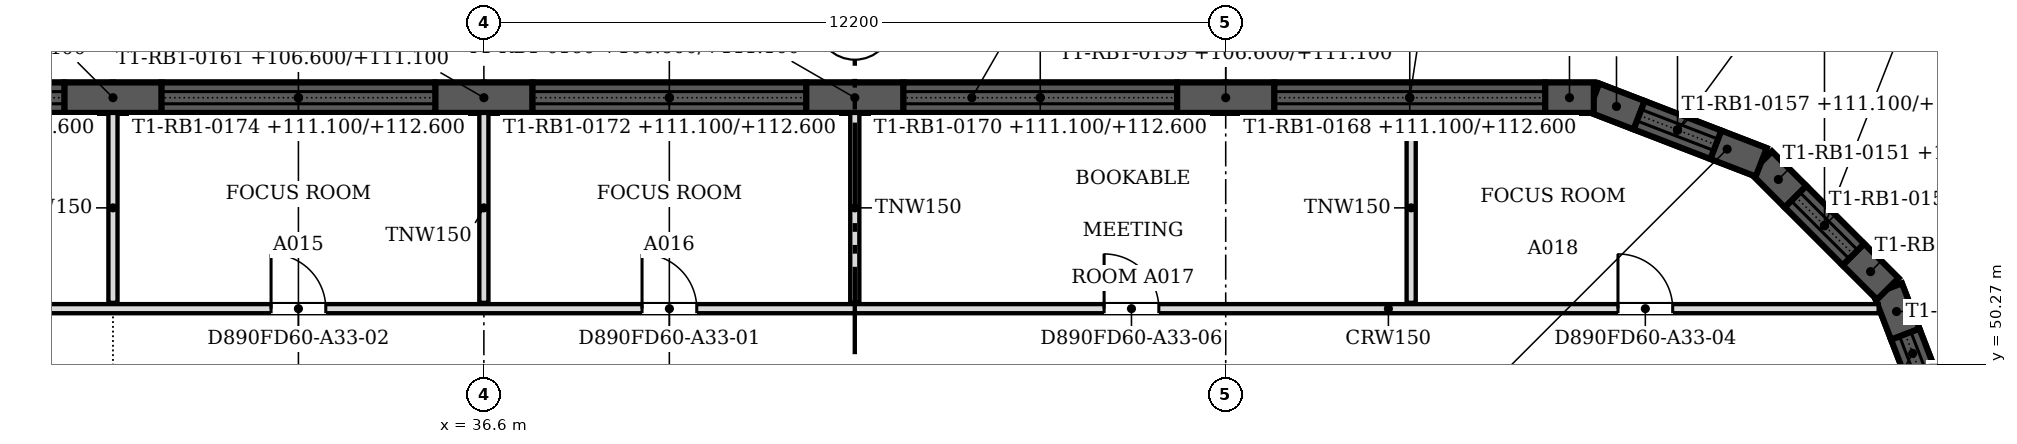
"""IFC4 building model, lengths in metres.
Left out: names, types, materials, properties, quantities, classifications, styles, units other than length and angle.
Written with IfcOpenShell. Run it as: python <this file> out.ifc"""

import sys

from ifc_helpers import new_model, si_unit, direction, frame, frame_2d, origin, place, context, subcontext, project, spatial, polyline, rectangle, outline, extrude, faceted_brep, source, transform, mapped, element, fill, save


model = new_model("IFC4")
c1 = context("Model", 3, precision=1e-05, world=origin(), true_north=direction((0.0, 1.0)))
c2 = subcontext(c1, "Body", "Model", "MODEL_VIEW")
j1 = project(units=[si_unit("LENGTHUNIT", "METRE"), si_unit("PLANEANGLEUNIT", "RADIAN")], contexts=[c1])
p1 = place(None, origin())
s1 = spatial("IfcSite", under=j1, at=p1, CompositionType="ELEMENT")
p2 = place(p1, origin())
s2 = spatial("IfcBuilding", under=s1, at=p2, CompositionType="ELEMENT")
p3 = place(p2, frame((0.0, 0.0, 106.6)))
s3 = spatial("IfcBuildingStorey", under=s2, at=p3, CompositionType="ELEMENT", Elevation=106.6)
m1 = source(origin(), c2, "Body", "Brep", [
    faceted_brep([(0.0, -0.25, 0.0), (0.8, -0.25, 0.0), (0.8, -0.25, 4.5), (0.0, -0.25, 4.5), (0.0, 0.25, 4.5), (0.747, 0.25, 4.5), (0.747, 0.25, 0.0), (0.0, 0.25, 0.0), (0.8, -0.0, 0.0), (0.8, -0.0, 4.5)], [[[0, 1, 2, 3]], [[4, 5, 6, 7]], [[7, 6, 8, 1, 0]], [[9, 2, 1, 8]], [[5, 4, 3, 2, 9]], [[4, 7, 0, 3]], [[8, 6, 5, 9]]]),
])
p4 = place(p3, frame((59.976, 50.76, 0.0), z_axis=(0.0, 0.0, 1.0), x_axis=(-0.360001058183, 0.932951894851, 0.0)))
e1 = element("IfcWall", 1, at=p4, inside=s3, PredefinedType="SOLIDWALL", context=c2, shape_type="MappedRepresentation", body=[
    mapped(m1, transform((0.0, 0.0, 0.0), scale=1.0)),
])
m2 = source(origin(), c2, "Body", "SweptSolid", [
    extrude(outline(polyline([(0.0, 0.0), (1.351, 0.0), (1.351, 1.0), (0.0, 1.0), (0.0, 0.0)])), frame((0.0, 0.25, 0.0), z_axis=(0.0, -1.0, 0.0), x_axis=(1.0, 0.0, 0.0)), (0.0, 0.0, 1.0), 0.5),
])
p5 = place(p3, frame((60.462, 49.5, 0.0), z_axis=(0.0, 0.0, 1.0), x_axis=(-0.359923772835, 0.932981713512, 0.0)))
e2 = element("IfcWall", 2, at=p5, inside=s3, PredefinedType="SOLIDWALL", context=c2, shape_type="MappedRepresentation", body=[
    mapped(m2, transform((0.0, 0.0, 0.0), scale=1.0)),
])
m3 = source(origin(), c2, "Body", "Brep", [
    faceted_brep([(0.0, -0.25, 0.0), (2.95, -0.25, 0.0), (2.95, -0.25, 1.5), (0.0, -0.25, 1.5), (0.047, 0.25, 1.5), (2.898, 0.25, 1.5), (2.898, 0.25, 0.0), (0.047, 0.25, 0.0), (2.95, 0.0, 0.0), (0.0, 0.0, 0.0), (2.95, 0.0, 1.5), (0.0, 0.0, 1.5)], [[[0, 1, 2, 3]], [[4, 5, 6, 7]], [[7, 6, 8, 1, 0, 9]], [[10, 2, 1, 8]], [[5, 4, 11, 3, 2, 10]], [[9, 0, 3, 11]], [[7, 9, 11, 4]], [[8, 6, 5, 10]]]),
])
p6 = place(p3, frame((60.75, 48.753, 4.5), z_axis=(0.0, 0.0, 1.0), x_axis=(-0.359877213415, 0.932999673775, 0.0)))
e3 = element("IfcWall", 3, at=p6, inside=s3, PredefinedType="SOLIDWALL", context=c2, shape_type="MappedRepresentation", body=[
    mapped(m3, transform((0.0, 0.0, 0.0), scale=1.0)),
])
m4 = source(origin(), c2, "Body", "Brep", [
    faceted_brep([(0.0, -0.25, 0.0), (0.8, -0.25, 0.0), (0.8, -0.25, 4.5), (0.0, -0.25, 4.5), (0.053, 0.25, 4.5), (0.8, 0.25, 4.5), (0.8, 0.25, 0.0), (0.053, 0.25, 0.0), (0.0, 0.0, 0.0), (0.0, 0.0, 4.5)], [[[0, 1, 2, 3]], [[4, 5, 6, 7]], [[7, 6, 1, 0, 8]], [[5, 4, 9, 3, 2]], [[8, 0, 3, 9]], [[7, 8, 9, 4]], [[1, 6, 5, 2]]]),
])
p7 = place(p3, frame((59.688, 51.506, 0.0), z_axis=(0.0, 0.0, 1.0), x_axis=(-0.707106781187, 0.707106781187, 0.0)))
e4 = element("IfcWall", 4, at=p7, inside=s3, PredefinedType="SOLIDWALL", context=c2, shape_type="MappedRepresentation", body=[
    mapped(m4, transform((0.0, 0.0, 0.0), scale=1.0)),
])
m5 = source(origin(), c2, "Body", "Brep", [
    faceted_brep([(0.0, -0.25, 0.0), (0.8, -0.25, 0.0), (0.8, -0.25, 4.5), (0.0, -0.25, 4.5), (0.0, 0.25, 4.5), (0.747, 0.25, 4.5), (0.747, 0.25, 0.0), (0.0, 0.25, 0.0), (0.8, -0.0, 0.0), (0.8, -0.0, 4.5)], [[[0, 1, 2, 3]], [[4, 5, 6, 7]], [[7, 6, 8, 1, 0]], [[9, 2, 1, 8]], [[5, 4, 3, 2, 9]], [[4, 7, 0, 3]], [[8, 6, 5, 9]]]),
])
p8 = place(p3, frame((58.172, 53.022, 0.0), z_axis=(0.0, 0.0, 1.0), x_axis=(-0.707106781187, 0.707106781187, 0.0)))
e5 = element("IfcWall", 5, at=p8, inside=s3, PredefinedType="SOLIDWALL", context=c2, shape_type="MappedRepresentation", body=[
    mapped(m5, transform((0.0, 0.0, 0.0), scale=1.0)),
])
m6 = source(origin(), c2, "Body", "SweptSolid", [
    extrude(outline(polyline([(0.0, 0.0), (1.344, 0.0), (1.344, 1.0), (0.0, 1.0), (0.0, 0.0)])), frame((0.0, 0.25, 0.0), z_axis=(0.0, -1.0, 0.0), x_axis=(1.0, 0.0, 0.0)), (0.0, 0.0, 1.0), 0.5),
])
p9 = place(p3, frame((59.122, 52.072, 0.0), z_axis=(0.0, 0.0, 1.0), x_axis=(-0.707106781187, 0.707106781187, 0.0)))
e6 = element("IfcWall", 6, at=p9, inside=s3, PredefinedType="SOLIDWALL", context=c2, shape_type="MappedRepresentation", body=[
    mapped(m6, transform((0.0, 0.0, 0.0), scale=1.0)),
])
m7 = source(origin(), c2, "Body", "Brep", [
    faceted_brep([(0.0, -0.25, 0.0), (2.944, -0.25, 0.0), (2.944, -0.25, 1.5), (0.0, -0.25, 1.5), (0.053, 0.25, 1.5), (2.891, 0.25, 1.5), (2.891, 0.25, 0.0), (0.053, 0.25, 0.0), (2.944, 0.0, 0.0), (0.0, 0.0, 0.0), (2.944, 0.0, 1.5), (0.0, 0.0, 1.5)], [[[0, 1, 2, 3]], [[4, 5, 6, 7]], [[7, 6, 8, 1, 0, 9]], [[10, 2, 1, 8]], [[5, 4, 11, 3, 2, 10]], [[9, 0, 3, 11]], [[7, 9, 11, 4]], [[8, 6, 5, 10]]]),
])
p10 = place(p3, frame((59.688, 51.506, 4.5), z_axis=(0.0, 0.0, 1.0), x_axis=(-0.707106781187, 0.707106781187, 0.0)))
e7 = element("IfcWall", 7, at=p10, inside=s3, PredefinedType="SOLIDWALL", context=c2, shape_type="MappedRepresentation", body=[
    mapped(m7, transform((0.0, 0.0, 0.0), scale=1.0)),
])
m8 = source(origin(), c2, "Body", "Brep", [
    faceted_brep([(0.0, -0.25, 0.0), (0.8, -0.25, 0.0), (0.8, -0.25, 4.5), (0.0, -0.25, 4.5), (0.053, 0.25, 4.5), (0.8, 0.25, 4.5), (0.8, 0.25, 0.0), (0.053, 0.25, 0.0), (0.0, 0.0, 0.0), (0.0, 0.0, 4.5)], [[[0, 1, 2, 3]], [[4, 5, 6, 7]], [[7, 6, 1, 0, 8]], [[5, 4, 9, 3, 2]], [[8, 0, 3, 9]], [[7, 8, 9, 4]], [[1, 6, 5, 2]]]),
])
p11 = place(p3, frame((57.606, 53.588, 0.0), z_axis=(0.0, 0.0, 1.0), x_axis=(-0.93301483327, 0.3598379092, 0.0)))
e8 = element("IfcWall", 8, at=p11, inside=s3, PredefinedType="SOLIDWALL", context=c2, shape_type="MappedRepresentation", body=[
    mapped(m8, transform((0.0, 0.0, 0.0), scale=1.0)),
])
m9 = source(origin(), c2, "Body", "Brep", [
    faceted_brep([(0.0, -0.25, 0.0), (0.8, -0.25, 0.0), (0.8, -0.25, 4.5), (0.0, -0.25, 4.5), (0.0, 0.25, 4.5), (0.753, 0.25, 4.5), (0.753, 0.25, 0.0), (0.0, 0.25, 0.0), (0.8, -0.0, 0.0), (0.8, -0.0, 4.5)], [[[0, 1, 2, 3]], [[4, 5, 6, 7]], [[7, 6, 8, 1, 0]], [[9, 2, 1, 8]], [[5, 4, 3, 2, 9]], [[4, 7, 0, 3]], [[8, 6, 5, 9]]]),
])
p12 = place(p3, frame((55.6, 54.362, 0.0), z_axis=(0.0, 0.0, 1.0), x_axis=(-0.93301483327, 0.3598379092, 0.0)))
e9 = element("IfcWall", 9, at=p12, inside=s3, PredefinedType="SOLIDWALL", context=c2, shape_type="MappedRepresentation", body=[
    mapped(m9, transform((0.0, 0.0, 0.0), scale=1.0)),
])
p13 = place(p3, frame((56.86, 53.876, 0.0), z_axis=(0.0, 0.0, 1.0), x_axis=(-0.932981713512, 0.359923772835, 0.0)))
e10 = element("IfcWall", 10, at=p13, inside=s3, PredefinedType="SOLIDWALL", context=c2, shape_type="MappedRepresentation", body=[
    mapped(m2, transform((0.0, 0.0, 0.0), scale=1.0)),
])
m10 = source(origin(), c2, "Body", "Brep", [
    faceted_brep([(0.0, -0.25, 0.0), (2.95, -0.25, 0.0), (2.95, -0.25, 1.5), (0.0, -0.25, 1.5), (0.053, 0.25, 1.5), (2.904, 0.25, 1.5), (2.904, 0.25, 0.0), (0.053, 0.25, 0.0), (2.95, 0.0, 0.0), (0.0, 0.0, 0.0), (2.95, 0.0, 1.5), (0.0, 0.0, 1.5)], [[[0, 1, 2, 3]], [[4, 5, 6, 7]], [[7, 6, 8, 1, 0, 9]], [[10, 2, 1, 8]], [[5, 4, 11, 3, 2, 10]], [[9, 0, 3, 11]], [[7, 9, 11, 4]], [[8, 6, 5, 10]]]),
])
p14 = place(p3, frame((57.606, 53.588, 4.5), z_axis=(0.0, 0.0, 1.0), x_axis=(-0.932999673775, 0.359877213415, 0.0)))
e11 = element("IfcWall", 11, at=p14, inside=s3, PredefinedType="SOLIDWALL", context=c2, shape_type="MappedRepresentation", body=[
    mapped(m10, transform((0.0, 0.0, 0.0), scale=1.0)),
])
m11 = source(origin(), c2, "Body", "Brep", [
    faceted_brep([(0.0, -0.25, 0.0), (0.8, -0.25, 0.0), (0.8, -0.25, 4.5), (0.0, -0.25, 4.5), (0.047, 0.25, 4.5), (0.8, 0.25, 4.5), (0.8, 0.25, 0.0), (0.047, 0.25, 0.0), (0.0, 0.0, 0.0), (0.0, 0.0, 4.5)], [[[0, 1, 2, 3]], [[4, 5, 6, 7]], [[7, 6, 1, 0, 8]], [[5, 4, 9, 3, 2]], [[8, 0, 3, 9]], [[7, 8, 9, 4]], [[1, 6, 5, 2]]]),
])
p15 = place(p3, frame((54.854, 54.65, 0.0), z_axis=(0.0, 0.0, 1.0), x_axis=(-1.0, 0.0, 0.0)))
e12 = element("IfcWall", 12, at=p15, inside=s3, PredefinedType="SOLIDWALL", context=c2, shape_type="MappedRepresentation", body=[
    mapped(m11, transform((0.0, 0.0, 0.0), scale=1.0)),
])
m12 = source(origin(), c2, "Body", "SweptSolid", [
    extrude(outline(polyline([(0.0, 0.0), (1.6, 0.0), (1.6, 4.5), (0.0, 4.5), (0.0, 0.0)])), frame((0.0, 0.25, 0.0), z_axis=(0.0, -1.0, 0.0), x_axis=(1.0, 0.0, 0.0)), (0.0, 0.0, 1.0), 0.5),
])
for number, where, z_axis, x_axis in (
    (13, (49.6, 54.65, 0.0), (0.0, 0.0, 1.0), (-1.0, 0.0, 0.0)),
    (14, (43.5, 54.65, 0.0), (0.0, 0.0, 1.0), (-1.0, 0.0, 0.0)),
):
    element("IfcWall", number, at=place(p3, frame(where, z_axis=z_axis, x_axis=x_axis)), inside=s3, PredefinedType="SOLIDWALL", context=c2, shape_type="MappedRepresentation", body=[
        mapped(m12, transform((0.0, 0.0, 0.0), scale=1.0)),
    ])
m13 = source(origin(), c2, "Body", "Brep", [
    faceted_brep([(0.0, -0.25, 0.0), (1.6, -0.25, 0.0), (1.6, -0.25, 4.5), (0.0, -0.25, 4.5), (0.0, 0.25, 4.5), (1.6, 0.25, 4.5), (1.6, 0.25, 0.0), (0.0, 0.25, 0.0)], [[[0, 1, 2, 3]], [[4, 5, 6, 7]], [[7, 6, 1, 0]], [[5, 4, 3, 2]], [[4, 7, 0, 3]], [[1, 6, 5, 2]]]),
])
p16 = place(p3, frame((37.4, 54.65, 0.0), z_axis=(0.0, 0.0, 1.0), x_axis=(-1.0, 0.0, 0.0)))
e15 = element("IfcWall", 15, at=p16, inside=s3, PredefinedType="SOLIDWALL", context=c2, shape_type="MappedRepresentation", body=[
    mapped(m13, transform((0.0, 0.0, 0.0), scale=1.0)),
])
p17 = place(p3, frame((31.3, 54.65, 0.0), z_axis=(0.0, 0.0, 1.0), x_axis=(-1.0, 0.0, 0.0)))
e16 = element("IfcWall", 16, at=p17, inside=s3, PredefinedType="SOLIDWALL", context=c2, shape_type="MappedRepresentation", body=[
    mapped(m12, transform((0.0, 0.0, 0.0), scale=1.0)),
])
m14 = source(origin(), c2, "Body", "SweptSolid", [
    extrude(outline(polyline([(0.0, 0.0), (4.453, 0.0), (4.453, 1.0), (0.0, 1.0), (0.0, 0.0)])), frame((0.0, 0.25, 0.0), z_axis=(0.0, -1.0, 0.0), x_axis=(1.0, 0.0, 0.0)), (0.0, 0.0, 1.0), 0.5),
])
p18 = place(p3, frame((54.053, 54.65, 0.0), z_axis=(0.0, 0.0, 1.0), x_axis=(-1.0, 0.0, 0.0)))
e17 = element("IfcWall", 17, at=p18, inside=s3, PredefinedType="SOLIDWALL", context=c2, shape_type="MappedRepresentation", body=[
    mapped(m14, transform((0.0, 0.0, 0.0), scale=1.0)),
])
m15 = source(origin(), c2, "Body", "Brep", [
    faceted_brep([(0.0, -0.25, 0.0), (6.053, -0.25, 0.0), (6.053, -0.25, 1.5), (0.0, -0.25, 1.5), (0.047, 0.25, 1.5), (6.053, 0.25, 1.5), (6.053, 0.25, 0.0), (0.047, 0.25, 0.0), (0.0, 0.0, 0.0), (0.0, 0.0, 1.5)], [[[0, 1, 2, 3]], [[4, 5, 6, 7]], [[7, 6, 1, 0, 8]], [[5, 4, 9, 3, 2]], [[8, 0, 3, 9]], [[7, 8, 9, 4]], [[1, 6, 5, 2]]]),
])
p19 = place(p3, frame((54.854, 54.65, 4.5), z_axis=(0.0, 0.0, 1.0), x_axis=(-1.0, 0.0, 0.0)))
e18 = element("IfcWall", 18, at=p19, inside=s3, PredefinedType="SOLIDWALL", context=c2, shape_type="MappedRepresentation", body=[
    mapped(m15, transform((0.0, 0.0, 0.0), scale=1.0)),
])
m16 = source(origin(), c2, "Body", "SweptSolid", [
    extrude(outline(polyline([(0.0, 0.0), (4.5, 0.0), (4.5, 1.0), (0.0, 1.0), (0.0, 0.0)])), frame((0.0, 0.25, 0.0), z_axis=(0.0, -1.0, 0.0), x_axis=(1.0, 0.0, 0.0)), (0.0, 0.0, 1.0), 0.5),
])
p20 = place(p3, frame((48.0, 54.65, 0.0), z_axis=(0.0, 0.0, 1.0), x_axis=(-1.0, 0.0, 0.0)))
e19 = element("IfcWall", 19, at=p20, inside=s3, PredefinedType="SOLIDWALL", context=c2, shape_type="MappedRepresentation", body=[
    mapped(m16, transform((0.0, 0.0, 0.0), scale=1.0)),
])
m17 = source(origin(), c2, "Body", "SweptSolid", [
    extrude(outline(polyline([(0.0, 0.0), (6.1, 0.0), (6.1, 1.5), (0.0, 1.5), (0.0, 0.0)])), frame((0.0, 0.25, 0.0), z_axis=(0.0, -1.0, 0.0), x_axis=(1.0, 0.0, 0.0)), (0.0, 0.0, 1.0), 0.5),
])
p21 = place(p3, frame((48.8, 54.65, 4.5), z_axis=(0.0, 0.0, 1.0), x_axis=(-1.0, 0.0, 0.0)))
e20 = element("IfcWall", 20, at=p21, inside=s3, PredefinedType="SOLIDWALL", context=c2, shape_type="MappedRepresentation", body=[
    mapped(m17, transform((0.0, 0.0, 0.0), scale=1.0)),
])
p22 = place(p3, frame((41.9, 54.65, 0.0), z_axis=(0.0, 0.0, 1.0), x_axis=(-1.0, 0.0, 0.0)))
e21 = element("IfcWall", 21, at=p22, inside=s3, PredefinedType="SOLIDWALL", context=c2, shape_type="MappedRepresentation", body=[
    mapped(m16, transform((0.0, 0.0, 0.0), scale=1.0)),
])
m18 = source(origin(), c2, "Body", "Brep", [
    faceted_brep([(0.0, -0.25, 0.0), (6.1, -0.25, 0.0), (6.1, -0.25, 1.5), (0.0, -0.25, 1.5), (0.0, 0.25, 1.5), (6.1, 0.25, 1.5), (6.1, 0.25, 0.0), (0.0, 0.25, 0.0)], [[[0, 1, 2, 3]], [[4, 5, 6, 7]], [[7, 6, 1, 0]], [[5, 4, 3, 2]], [[4, 7, 0, 3]], [[1, 6, 5, 2]]]),
])
p23 = place(p3, frame((42.7, 54.65, 4.5), z_axis=(0.0, 0.0, 1.0), x_axis=(-1.0, 0.0, 0.0)))
e22 = element("IfcWall", 22, at=p23, inside=s3, PredefinedType="SOLIDWALL", context=c2, shape_type="MappedRepresentation", body=[
    mapped(m18, transform((0.0, 0.0, 0.0), scale=1.0)),
])
p24 = place(p3, frame((35.8, 54.65, 0.0), z_axis=(0.0, 0.0, 1.0), x_axis=(-1.0, 0.0, 0.0)))
e23 = element("IfcWall", 23, at=p24, inside=s3, PredefinedType="SOLIDWALL", context=c2, shape_type="MappedRepresentation", body=[
    mapped(m16, transform((0.0, 0.0, 0.0), scale=1.0)),
])
p25 = place(p3, frame((36.6, 54.65, 4.5), z_axis=(0.0, 0.0, 1.0), x_axis=(-1.0, 0.0, 0.0)))
e24 = element("IfcWall", 24, at=p25, inside=s3, PredefinedType="SOLIDWALL", context=c2, shape_type="MappedRepresentation", body=[
    mapped(m17, transform((0.0, 0.0, 0.0), scale=1.0)),
])
p26 = place(p3, frame((29.7, 54.65, 0.0), z_axis=(0.0, 0.0, 1.0), x_axis=(-1.0, 0.0, 0.0)))
e25 = element("IfcWall", 25, at=p26, inside=s3, PredefinedType="SOLIDWALL", context=c2, shape_type="MappedRepresentation", body=[
    mapped(m16, transform((0.0, 0.0, 0.0), scale=1.0)),
])
p27 = place(p3, frame((30.5, 54.65, 4.5), z_axis=(0.0, 0.0, 1.0), x_axis=(-1.0, 0.0, 0.0)))
e26 = element("IfcWall", 26, at=p27, inside=s3, PredefinedType="SOLIDWALL", context=c2, shape_type="MappedRepresentation", body=[
    mapped(m17, transform((0.0, 0.0, 0.0), scale=1.0)),
])
p28 = place(p3, frame((28.176, 51.18, 0.0), z_axis=(0.0, 0.0, 1.0), x_axis=(1.0, 0.0, 0.0)))
e27 = element("IfcWall", 27, at=p28, inside=s3, PredefinedType="PARTITIONING", context=c2, shape_type="SweptSolid", body=[
    extrude(rectangle(XDim=31.362, YDim=0.15, at=frame_2d((15.681, 0.0))), origin(), (0.0, 0.0, 1.0), 5.167),
])
m19 = source(origin(), c2, "Body", "SweptSolid", [
    extrude(rectangle(XDim=0.9, YDim=2.1, at=frame_2d((0.45, 1.05))), frame((0.0, 0.085, 0.0), z_axis=(0.0, -1.0, 0.0), x_axis=(1.0, 0.0, 0.0)), (0.0, 0.0, 1.0), 0.17),
])
p29 = place(p28, frame((11.025, 0.0, 0.0)))
e28 = element("IfcOpeningElement", 28, at=p29, cuts=e27, PredefinedType="OPENING", context=c2, shape_type="MappedRepresentation", body=[
    mapped(m19, transform((0.0, 0.0, 0.0), scale=1.0)),
])
p30 = place(p28, frame((4.924, 0.0, 0.0)))
e29 = element("IfcOpeningElement", 29, at=p30, cuts=e27, PredefinedType="OPENING", context=c2, shape_type="MappedRepresentation", body=[
    mapped(m19, transform((0.0, 0.0, 0.0), scale=1.0)),
])
p31 = place(p28, frame((27.075, 0.0, 0.0)))
e30 = element("IfcOpeningElement", 30, at=p31, cuts=e27, PredefinedType="OPENING", context=c2, shape_type="MappedRepresentation", body=[
    mapped(m19, transform((0.0, 0.0, 0.0), scale=1.0)),
])
p32 = place(p28, frame((18.624, 0.0, 0.0)))
e31 = element("IfcOpeningElement", 31, at=p32, cuts=e27, PredefinedType="OPENING", context=c2, shape_type="MappedRepresentation", body=[
    mapped(m19, transform((0.0, 0.0, 0.0), scale=1.0)),
])
for number, where, z_axis, x_axis in (
    (32, (30.5, 51.276, 0.0), (0.0, 0.0, 1.0), (0.0, 1.0, 0.0)),
    (33, (36.6, 51.276, 0.0), (0.0, 0.0, 1.0), (0.0, 1.0, 0.0)),
    (34, (42.7, 51.276, 0.0), (0.0, 0.0, 1.0), (0.0, 1.0, 0.0)),
    (35, (51.85, 51.276, 0.0), (0.0, 0.0, 1.0), (0.0, 1.0, 0.0)),
):
    element("IfcWall", number, at=place(p3, frame(where, z_axis=z_axis, x_axis=x_axis)), inside=s3, PredefinedType="PARTITIONING", context=c2, shape_type="SweptSolid", body=[
        extrude(rectangle(XDim=3.124, YDim=0.15, at=frame_2d((1.562, 0.0))), origin(), (0.0, 0.0, 1.0), 5.167),
    ])
m20 = source(origin(), c2, "Body", "SweptSolid", [
    extrude(rectangle(XDim=0.9, YDim=2.1, at=frame_2d((0.45, 1.05))), frame((0.0, 0.025, 0.0), z_axis=(0.0, -1.0, 0.0), x_axis=(1.0, 0.0, 0.0)), (0.0, 0.0, 1.0), 0.05),
])
p33 = place(p29, origin())
e36 = element("IfcDoor", 36, at=p33, inside=s3, OperationType="SINGLE_SWING_LEFT", PredefinedType="DOOR", context=c2, shape_type="MappedRepresentation", body=[
    mapped(m20, transform((0.0, 0.0, 0.0), scale=1.0)),
])
fill(e28, e36)
p34 = place(p30, origin())
e37 = element("IfcDoor", 37, at=p34, inside=s3, OperationType="SINGLE_SWING_LEFT", PredefinedType="DOOR", context=c2, shape_type="MappedRepresentation", body=[
    mapped(m20, transform((0.0, 0.0, 0.0), scale=1.0)),
])
fill(e29, e37)
p35 = place(p31, origin())
e38 = element("IfcDoor", 38, at=p35, inside=s3, OperationType="SINGLE_SWING_LEFT", PredefinedType="DOOR", context=c2, shape_type="MappedRepresentation", body=[
    mapped(m20, transform((0.0, 0.0, 0.0), scale=1.0)),
])
fill(e30, e38)
p36 = place(p32, origin())
e39 = element("IfcDoor", 39, at=p36, inside=s3, OperationType="SINGLE_SWING_LEFT", PredefinedType="DOOR", context=c2, shape_type="MappedRepresentation", body=[
    mapped(m20, transform((0.0, 0.0, 0.0), scale=1.0)),
])
fill(e31, e39)
save(model, sys.argv[1])
